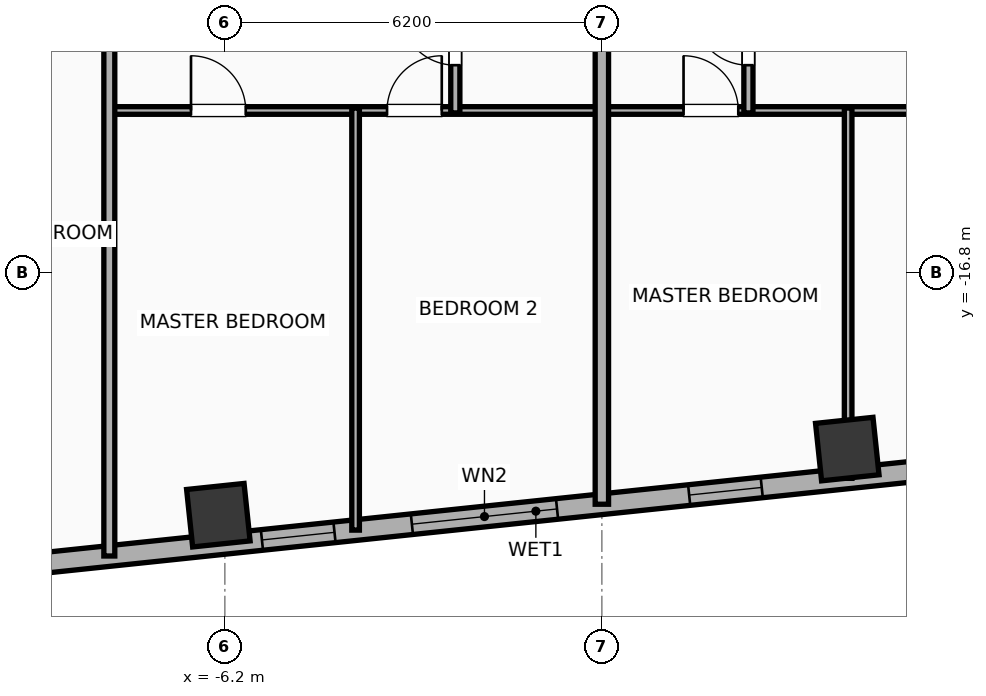
"""IFC4 building model, lengths in metres.
Left out: names, types, materials, properties, quantities, classifications, styles, units other than length and angle.
Written with IfcOpenShell. Run it as: python <this file> out.ifc"""

import sys

from ifc_helpers import new_model, si_unit, direction, frame, frame_2d, origin, origin_2d, place, context, subcontext, project, spatial, rectangle, hollow_rectangle, extrude, element, fill, save


model = new_model("IFC4")
c1 = context("Model", 3, precision=1e-05, world=origin(), true_north=direction((0.0, 1.0)))
c2 = subcontext(c1, "Body", "Model", "MODEL_VIEW")
j1 = project(units=[si_unit("LENGTHUNIT", "METRE"), si_unit("PLANEANGLEUNIT", "RADIAN")], contexts=[c1])
p1 = place(None, origin())
s1 = spatial("IfcSite", under=j1, at=p1, CompositionType="ELEMENT")
p2 = place(p1, origin())
s2 = spatial("IfcBuilding", under=s1, at=p2, CompositionType="ELEMENT")
p3 = place(p2, frame((0.0, 0.0, 175.5)))
s3 = spatial("IfcBuildingStorey", under=s2, at=p3, CompositionType="ELEMENT", Elevation=175.5)
for number, where, z_axis, x_axis in (
    (1, (-6.307, -20.785, 0.0), (0.0, 0.0, 1.0), (0.995, 0.105, 0.0)),
    (2, (4.036, -19.698, 0.0), (0.0, 0.0, 1.0), (0.995, 0.105, 0.0)),
):
    element("IfcColumn", number, at=place(p3, frame(where, z_axis=z_axis, x_axis=x_axis)), inside=s3, PredefinedType="COLUMN", context=c2, shape_type="SweptSolid", body=[
        extrude(hollow_rectangle(XDim=0.95, YDim=0.95, WallThickness=0.032, at=origin_2d()), origin(), (0.0, 0.0, 1.0), 3.9),
    ])
p4 = place(p3, frame((24.756, -18.003, 0.0), z_axis=(0.0, 0.0, 1.0), x_axis=(-0.99452160744, -0.104531202687, 0.0)))
e3 = element("IfcWall", 3, at=p4, inside=s3, PredefinedType="ELEMENTEDWALL", context=c2, shape_type="SweptSolid", body=[
    extrude(rectangle(XDim=51.967, YDim=0.34, at=frame_2d((25.983, 0.0))), origin(), (0.0, 0.0, 1.0), 3.65),
])
p5 = place(p4, frame((25.633, 0.0, 0.75)))
e4 = element("IfcOpeningElement", 4, at=p5, cuts=e3, PredefinedType="OPENING", context=c2, shape_type="SweptSolid", body=[
    extrude(rectangle(XDim=2.4, YDim=2.1, at=frame_2d((1.2, 1.05))), frame((0.0, 0.18, 0.0), z_axis=(0.0, -1.0, 0.0), x_axis=(1.0, 0.0, 0.0)), (0.0, 0.0, 1.0), 0.36),
])
p6 = place(p4, frame((42.318, 0.0, 0.75)))
e5 = element("IfcOpeningElement", 5, at=p6, cuts=e3, PredefinedType="OPENING", context=c2, shape_type="SweptSolid", body=[
    extrude(rectangle(XDim=1.2, YDim=2.05, at=frame_2d((0.6, 1.025))), frame((0.0, 0.18, 0.0), z_axis=(0.0, -1.0, 0.0), x_axis=(1.0, 0.0, 0.0)), (0.0, 0.0, 1.0), 0.36),
])
p7 = place(p4, frame((34.121, 0.0, 0.75)))
e6 = element("IfcOpeningElement", 6, at=p7, cuts=e3, PredefinedType="OPENING", context=c2, shape_type="SweptSolid", body=[
    extrude(rectangle(XDim=1.2, YDim=2.05, at=frame_2d((0.6, 1.025))), frame((0.0, 0.18, 0.0), z_axis=(0.0, -1.0, 0.0), x_axis=(1.0, 0.0, 0.0)), (0.0, 0.0, 1.0), 0.36),
])
p8 = place(p4, frame((37.092, 0.0, 0.75)))
e7 = element("IfcOpeningElement", 7, at=p8, cuts=e3, PredefinedType="OPENING", context=c2, shape_type="SweptSolid", body=[
    extrude(rectangle(XDim=1.2, YDim=2.05, at=frame_2d((0.6, 1.025))), frame((0.0, 0.18, 0.0), z_axis=(0.0, -1.0, 0.0), x_axis=(1.0, 0.0, 0.0)), (0.0, 0.0, 1.0), 0.36),
])
p9 = place(p4, frame((14.359, 0.0, 0.75)))
e8 = element("IfcOpeningElement", 8, at=p9, cuts=e3, PredefinedType="OPENING", context=c2, shape_type="SweptSolid", body=[
    extrude(rectangle(XDim=1.2, YDim=2.05, at=frame_2d((0.6, 1.025))), frame((0.0, 0.18, 0.0), z_axis=(0.0, -1.0, 0.0), x_axis=(1.0, 0.0, 0.0)), (0.0, 0.0, 1.0), 0.36),
])
p10 = place(p4, frame((11.388, 0.0, 0.75)))
e9 = element("IfcOpeningElement", 9, at=p10, cuts=e3, PredefinedType="OPENING", context=c2, shape_type="SweptSolid", body=[
    extrude(rectangle(XDim=1.2, YDim=2.05, at=frame_2d((0.6, 1.025))), frame((0.0, 0.18, 0.0), z_axis=(0.0, -1.0, 0.0), x_axis=(1.0, 0.0, 0.0)), (0.0, 0.0, 1.0), 0.36),
])
p11 = place(p4, frame((8.332, 0.0, 0.75)))
e10 = element("IfcOpeningElement", 10, at=p11, cuts=e3, PredefinedType="OPENING", context=c2, shape_type="SweptSolid", body=[
    extrude(rectangle(XDim=1.2, YDim=2.05, at=frame_2d((0.6, 1.025))), frame((0.0, 0.18, 0.0), z_axis=(0.0, -1.0, 0.0), x_axis=(1.0, 0.0, 0.0)), (0.0, 0.0, 1.0), 0.36),
])
p12 = place(p4, frame((5.331, 0.0, 0.75)))
e11 = element("IfcOpeningElement", 11, at=p12, cuts=e3, PredefinedType="OPENING", context=c2, shape_type="SweptSolid", body=[
    extrude(rectangle(XDim=1.2, YDim=2.05, at=frame_2d((0.6, 1.025))), frame((0.0, 0.18, 0.0), z_axis=(0.0, -1.0, 0.0), x_axis=(1.0, 0.0, 0.0)), (0.0, 0.0, 1.0), 0.36),
])
p13 = place(p4, frame((29.313, 0.0, 0.75)))
e12 = element("IfcOpeningElement", 12, at=p13, cuts=e3, PredefinedType="OPENING", context=c2, shape_type="SweptSolid", body=[
    extrude(rectangle(XDim=1.2, YDim=2.05, at=frame_2d((0.6, 1.025))), frame((0.0, 0.18, 0.0), z_axis=(0.0, -1.0, 0.0), x_axis=(1.0, 0.0, 0.0)), (0.0, 0.0, 1.0), 0.36),
])
p14 = place(p4, frame((22.248, 0.0, 0.75)))
e13 = element("IfcOpeningElement", 13, at=p14, cuts=e3, PredefinedType="OPENING", context=c2, shape_type="SweptSolid", body=[
    extrude(rectangle(XDim=1.2, YDim=2.05, at=frame_2d((0.6, 1.025))), frame((0.0, 0.18, 0.0), z_axis=(0.0, -1.0, 0.0), x_axis=(1.0, 0.0, 0.0)), (0.0, 0.0, 1.0), 0.36),
])
p15 = place(p4, frame((18.186, 0.0, 0.75)))
e14 = element("IfcOpeningElement", 14, at=p15, cuts=e3, PredefinedType="OPENING", context=c2, shape_type="SweptSolid", body=[
    extrude(rectangle(XDim=1.2, YDim=2.05, at=frame_2d((0.6, 1.025))), frame((0.0, 0.18, 0.0), z_axis=(0.0, -1.0, 0.0), x_axis=(1.0, 0.0, 0.0)), (0.0, 0.0, 1.0), 0.36),
])
p16 = place(p4, frame((48.13, 0.0, 0.75)))
e15 = element("IfcOpeningElement", 15, at=p16, cuts=e3, PredefinedType="OPENING", context=c2, shape_type="SweptSolid", body=[
    extrude(rectangle(XDim=1.2, YDim=2.05, at=frame_2d((0.6, 1.025))), frame((0.0, 0.18, 0.0), z_axis=(0.0, -1.0, 0.0), x_axis=(1.0, 0.0, 0.0)), (0.0, 0.0, 1.0), 0.36),
])
p17 = place(p4, frame((50.09, 0.0, 0.75)))
e16 = element("IfcOpeningElement", 16, at=p17, cuts=e3, PredefinedType="OPENING", context=c2, shape_type="SweptSolid", body=[
    extrude(rectangle(XDim=1.2, YDim=2.05, at=frame_2d((0.6, 1.025))), frame((0.0, 0.18, 0.0), z_axis=(0.0, -1.0, 0.0), x_axis=(1.0, 0.0, 0.0)), (0.0, 0.0, 1.0), 0.36),
])
p18 = place(p4, frame((0.718, 0.0, 0.75)))
e17 = element("IfcOpeningElement", 17, at=p18, cuts=e3, PredefinedType="OPENING", context=c2, shape_type="SweptSolid", body=[
    extrude(rectangle(XDim=1.2, YDim=2.05, at=frame_2d((0.6, 1.025))), frame((0.0, 0.18, 0.0), z_axis=(0.0, -1.0, 0.0), x_axis=(1.0, 0.0, 0.0)), (0.0, 0.0, 1.0), 0.36),
])
p19 = place(p3, frame((-8.08, -14.13, 0.0), z_axis=(0.0, 0.0, 1.0), x_axis=(1.0, 0.0, 0.0)))
e18 = element("IfcWall", 18, at=p19, inside=s3, PredefinedType="PARTITIONING", context=c2, shape_type="SweptSolid", body=[
    extrude(rectangle(XDim=8.06, YDim=0.125, at=frame_2d((4.03, 0.0))), origin(), (0.0, 0.0, 1.0), 3.65),
])
p20 = place(p19, frame((1.323, 0.0, 0.0)))
e19 = element("IfcOpeningElement", 19, at=p20, cuts=e18, PredefinedType="OPENING", context=c2, shape_type="SweptSolid", body=[
    extrude(rectangle(XDim=0.9, YDim=2.05, at=frame_2d((0.45, 1.025))), frame((0.0, 0.073, 0.0), z_axis=(0.0, -1.0, 0.0), x_axis=(1.0, 0.0, 0.0)), (0.0, 0.0, 1.0), 0.145),
])
p21 = place(p19, frame((4.547, 0.0, 0.0)))
e20 = element("IfcOpeningElement", 20, at=p21, cuts=e18, PredefinedType="OPENING", context=c2, shape_type="SweptSolid", body=[
    extrude(rectangle(XDim=0.9, YDim=2.05, at=frame_2d((0.45, 1.025))), frame((0.0, 0.073, 0.0), z_axis=(0.0, -1.0, 0.0), x_axis=(1.0, 0.0, 0.0)), (0.0, 0.0, 1.0), 0.145),
])
p22 = place(p3, frame((-2.41, -14.17, 0.0), z_axis=(0.0, 0.0, 1.0), x_axis=(0.0, 1.0, 0.0)))
e21 = element("IfcWall", 21, at=p22, inside=s3, PredefinedType="PLUMBINGWALL", context=c2, shape_type="SweptSolid", body=[
    extrude(rectangle(XDim=2.47, YDim=0.15, at=frame_2d((1.235, 0.0))), origin(), (0.0, 0.0, 1.0), 3.65),
])
p23 = place(p22, frame((0.785, 0.0, 0.0)))
e22 = element("IfcOpeningElement", 22, at=p23, cuts=e21, PredefinedType="OPENING", context=c2, shape_type="SweptSolid", body=[
    extrude(rectangle(XDim=0.9, YDim=2.05, at=frame_2d((0.45, 1.025))), frame((0.0, 0.085, 0.0), z_axis=(0.0, -1.0, 0.0), x_axis=(1.0, 0.0, 0.0)), (0.0, 0.0, 1.0), 0.17),
])
p24 = place(p3, frame((-4.05, -21.031, 0.0), z_axis=(0.0, 0.0, 1.0), x_axis=(0.0, 1.0, 0.0)))
e23 = element("IfcWall", 23, at=p24, inside=s3, PredefinedType="PARTITIONING", context=c2, shape_type="SweptSolid", body=[
    extrude(rectangle(XDim=6.941, YDim=0.125, at=frame_2d((3.47, 0.0))), origin(), (0.0, 0.0, 1.0), 3.65),
])
p25 = place(p3, frame((-8.1, -21.456, 0.0), z_axis=(0.0, 0.0, 1.0), x_axis=(0.0, 1.0, 0.0)))
e24 = element("IfcWall", 24, at=p25, inside=s3, PredefinedType="PARTITIONING", context=c2, shape_type="SweptSolid", body=[
    extrude(rectangle(XDim=12.166, YDim=0.18, at=frame_2d((6.083, 0.0))), origin(), (0.0, 0.0, 1.0), 3.65),
])
p26 = place(p25, frame((10.916, 0.0, 0.0)))
e25 = element("IfcOpeningElement", 25, at=p26, cuts=e24, PredefinedType="OPENING", context=c2, shape_type="SweptSolid", body=[
    extrude(rectangle(XDim=0.9, YDim=2.05, at=frame_2d((0.45, 1.025))), frame((0.0, 0.1, 0.0), z_axis=(0.0, -1.0, 0.0), x_axis=(1.0, 0.0, 0.0)), (0.0, 0.0, 1.0), 0.2),
])
p27 = place(p3, frame((0.02, -14.13, 0.0), z_axis=(0.0, 0.0, 1.0), x_axis=(1.0, 0.0, 0.0)))
e26 = element("IfcWall", 26, at=p27, inside=s3, PredefinedType="PARTITIONING", context=c2, shape_type="SweptSolid", body=[
    extrude(rectangle(XDim=8.06, YDim=0.125, at=frame_2d((4.03, 0.0))), origin(), (0.0, 0.0, 1.0), 3.65),
])
p28 = place(p27, frame((1.323, 0.0, 0.0)))
e27 = element("IfcOpeningElement", 27, at=p28, cuts=e26, PredefinedType="OPENING", context=c2, shape_type="SweptSolid", body=[
    extrude(rectangle(XDim=0.9, YDim=2.05, at=frame_2d((0.45, 1.025))), frame((0.0, 0.073, 0.0), z_axis=(0.0, -1.0, 0.0), x_axis=(1.0, 0.0, 0.0)), (0.0, 0.0, 1.0), 0.145),
])
p29 = place(p27, frame((5.837, 0.0, 0.0)))
e28 = element("IfcOpeningElement", 28, at=p29, cuts=e26, PredefinedType="OPENING", context=c2, shape_type="SweptSolid", body=[
    extrude(rectangle(XDim=0.9, YDim=2.05, at=frame_2d((0.45, 1.025))), frame((0.0, 0.073, 0.0), z_axis=(0.0, -1.0, 0.0), x_axis=(1.0, 0.0, 0.0)), (0.0, 0.0, 1.0), 0.145),
])
p30 = place(p3, frame((2.41, -14.17, 0.0), z_axis=(0.0, 0.0, 1.0), x_axis=(0.0, 1.0, 0.0)))
e29 = element("IfcWall", 29, at=p30, inside=s3, PredefinedType="PLUMBINGWALL", context=c2, shape_type="SweptSolid", body=[
    extrude(rectangle(XDim=2.47, YDim=0.15, at=frame_2d((1.235, 0.0))), origin(), (0.0, 0.0, 1.0), 3.65),
])
p31 = place(p30, frame((0.785, 0.0, 0.0)))
e30 = element("IfcOpeningElement", 30, at=p31, cuts=e29, PredefinedType="OPENING", context=c2, shape_type="SweptSolid", body=[
    extrude(rectangle(XDim=0.9, YDim=2.05, at=frame_2d((0.45, 1.025))), frame((0.0, 0.085, 0.0), z_axis=(0.0, -1.0, 0.0), x_axis=(1.0, 0.0, 0.0)), (0.0, 0.0, 1.0), 0.17),
])
p32 = place(p3, frame((4.05, -20.179, 0.0), z_axis=(0.0, 0.0, 1.0), x_axis=(0.0, 1.0, 0.0)))
e31 = element("IfcWall", 31, at=p32, inside=s3, PredefinedType="PARTITIONING", context=c2, shape_type="SweptSolid", body=[
    extrude(rectangle(XDim=6.089, YDim=0.125, at=frame_2d((3.045, 0.0))), origin(), (0.0, 0.0, 1.0), 3.04),
])
p33 = place(p3, frame((0.0, -20.605, 0.0), z_axis=(0.0, 0.0, 1.0), x_axis=(0.0, 1.0, 0.0)))
e32 = element("IfcWall", 32, at=p33, inside=s3, PredefinedType="PARTITIONING", context=c2, shape_type="SweptSolid", body=[
    extrude(rectangle(XDim=11.315, YDim=0.22, at=frame_2d((5.657, 0.0))), origin(), (0.0, 0.0, 1.0), 3.65),
])
p34 = place(p5, origin())
e33 = element("IfcWindow", 33, at=p34, inside=s3, PartitioningType="SINGLE_PANEL", PredefinedType="WINDOW", context=c2, shape_type="SweptSolid", body=[
    extrude(rectangle(XDim=2.4, YDim=2.1, at=frame_2d((1.2, 1.05))), frame((0.0, 0.03, 0.0), z_axis=(0.0, -1.0, 0.0), x_axis=(1.0, 0.0, 0.0)), (0.0, 0.0, 1.0), 0.06),
])
fill(e4, e33)
p35 = place(p13, origin())
e34 = element("IfcWindow", 34, at=p35, inside=s3, PartitioningType="SINGLE_PANEL", PredefinedType="WINDOW", context=c2, shape_type="SweptSolid", body=[
    extrude(rectangle(XDim=1.2, YDim=2.05, at=frame_2d((0.6, 1.025))), frame((0.0, 0.03, 0.0), z_axis=(0.0, -1.0, 0.0), x_axis=(1.0, 0.0, 0.0)), (0.0, 0.0, 1.0), 0.06),
])
fill(e12, e34)
p36 = place(p14, origin())
e35 = element("IfcWindow", 35, at=p36, inside=s3, PartitioningType="SINGLE_PANEL", PredefinedType="WINDOW", context=c2, shape_type="SweptSolid", body=[
    extrude(rectangle(XDim=1.2, YDim=2.05, at=frame_2d((0.6, 1.025))), frame((0.0, 0.03, 0.0), z_axis=(0.0, -1.0, 0.0), x_axis=(1.0, 0.0, 0.0)), (0.0, 0.0, 1.0), 0.06),
])
fill(e13, e35)
p37 = place(p20, origin())
e36 = element("IfcDoor", 36, at=p37, inside=s3, OperationType="SINGLE_SWING_LEFT", PredefinedType="DOOR", context=c2, shape_type="SweptSolid", body=[
    extrude(rectangle(XDim=0.9, YDim=2.05, at=frame_2d((0.45, 1.025))), frame((0.0, 0.025, 0.0), z_axis=(0.0, -1.0, 0.0), x_axis=(1.0, 0.0, 0.0)), (0.0, 0.0, 1.0), 0.05),
])
fill(e19, e36)
p38 = place(p21, origin())
e37 = element("IfcDoor", 37, at=p38, inside=s3, OperationType="SINGLE_SWING_RIGHT", PredefinedType="DOOR", context=c2, shape_type="SweptSolid", body=[
    extrude(rectangle(XDim=0.9, YDim=2.05, at=frame_2d((0.45, 1.025))), frame((0.0, 0.025, 0.0), z_axis=(0.0, -1.0, 0.0), x_axis=(1.0, 0.0, 0.0)), (0.0, 0.0, 1.0), 0.05),
])
fill(e20, e37)
p39 = place(p23, origin())
e38 = element("IfcDoor", 38, at=p39, inside=s3, OperationType="SINGLE_SWING_RIGHT", PredefinedType="DOOR", context=c2, shape_type="SweptSolid", body=[
    extrude(rectangle(XDim=0.9, YDim=2.05, at=frame_2d((0.45, 1.025))), frame((0.0, 0.025, 0.0), z_axis=(0.0, -1.0, 0.0), x_axis=(1.0, 0.0, 0.0)), (0.0, 0.0, 1.0), 0.05),
])
fill(e22, e38)
p40 = place(p28, origin())
e39 = element("IfcDoor", 39, at=p40, inside=s3, OperationType="SINGLE_SWING_LEFT", PredefinedType="DOOR", context=c2, shape_type="SweptSolid", body=[
    extrude(rectangle(XDim=0.9, YDim=2.05, at=frame_2d((0.45, 1.025))), frame((0.0, 0.025, 0.0), z_axis=(0.0, -1.0, 0.0), x_axis=(1.0, 0.0, 0.0)), (0.0, 0.0, 1.0), 0.05),
])
fill(e27, e39)
p41 = place(p31, origin())
e40 = element("IfcDoor", 40, at=p41, inside=s3, OperationType="SINGLE_SWING_RIGHT", PredefinedType="DOOR", context=c2, shape_type="SweptSolid", body=[
    extrude(rectangle(XDim=0.9, YDim=2.05, at=frame_2d((0.45, 1.025))), frame((0.0, 0.025, 0.0), z_axis=(0.0, -1.0, 0.0), x_axis=(1.0, 0.0, 0.0)), (0.0, 0.0, 1.0), 0.05),
])
fill(e30, e40)
save(model, sys.argv[1])
